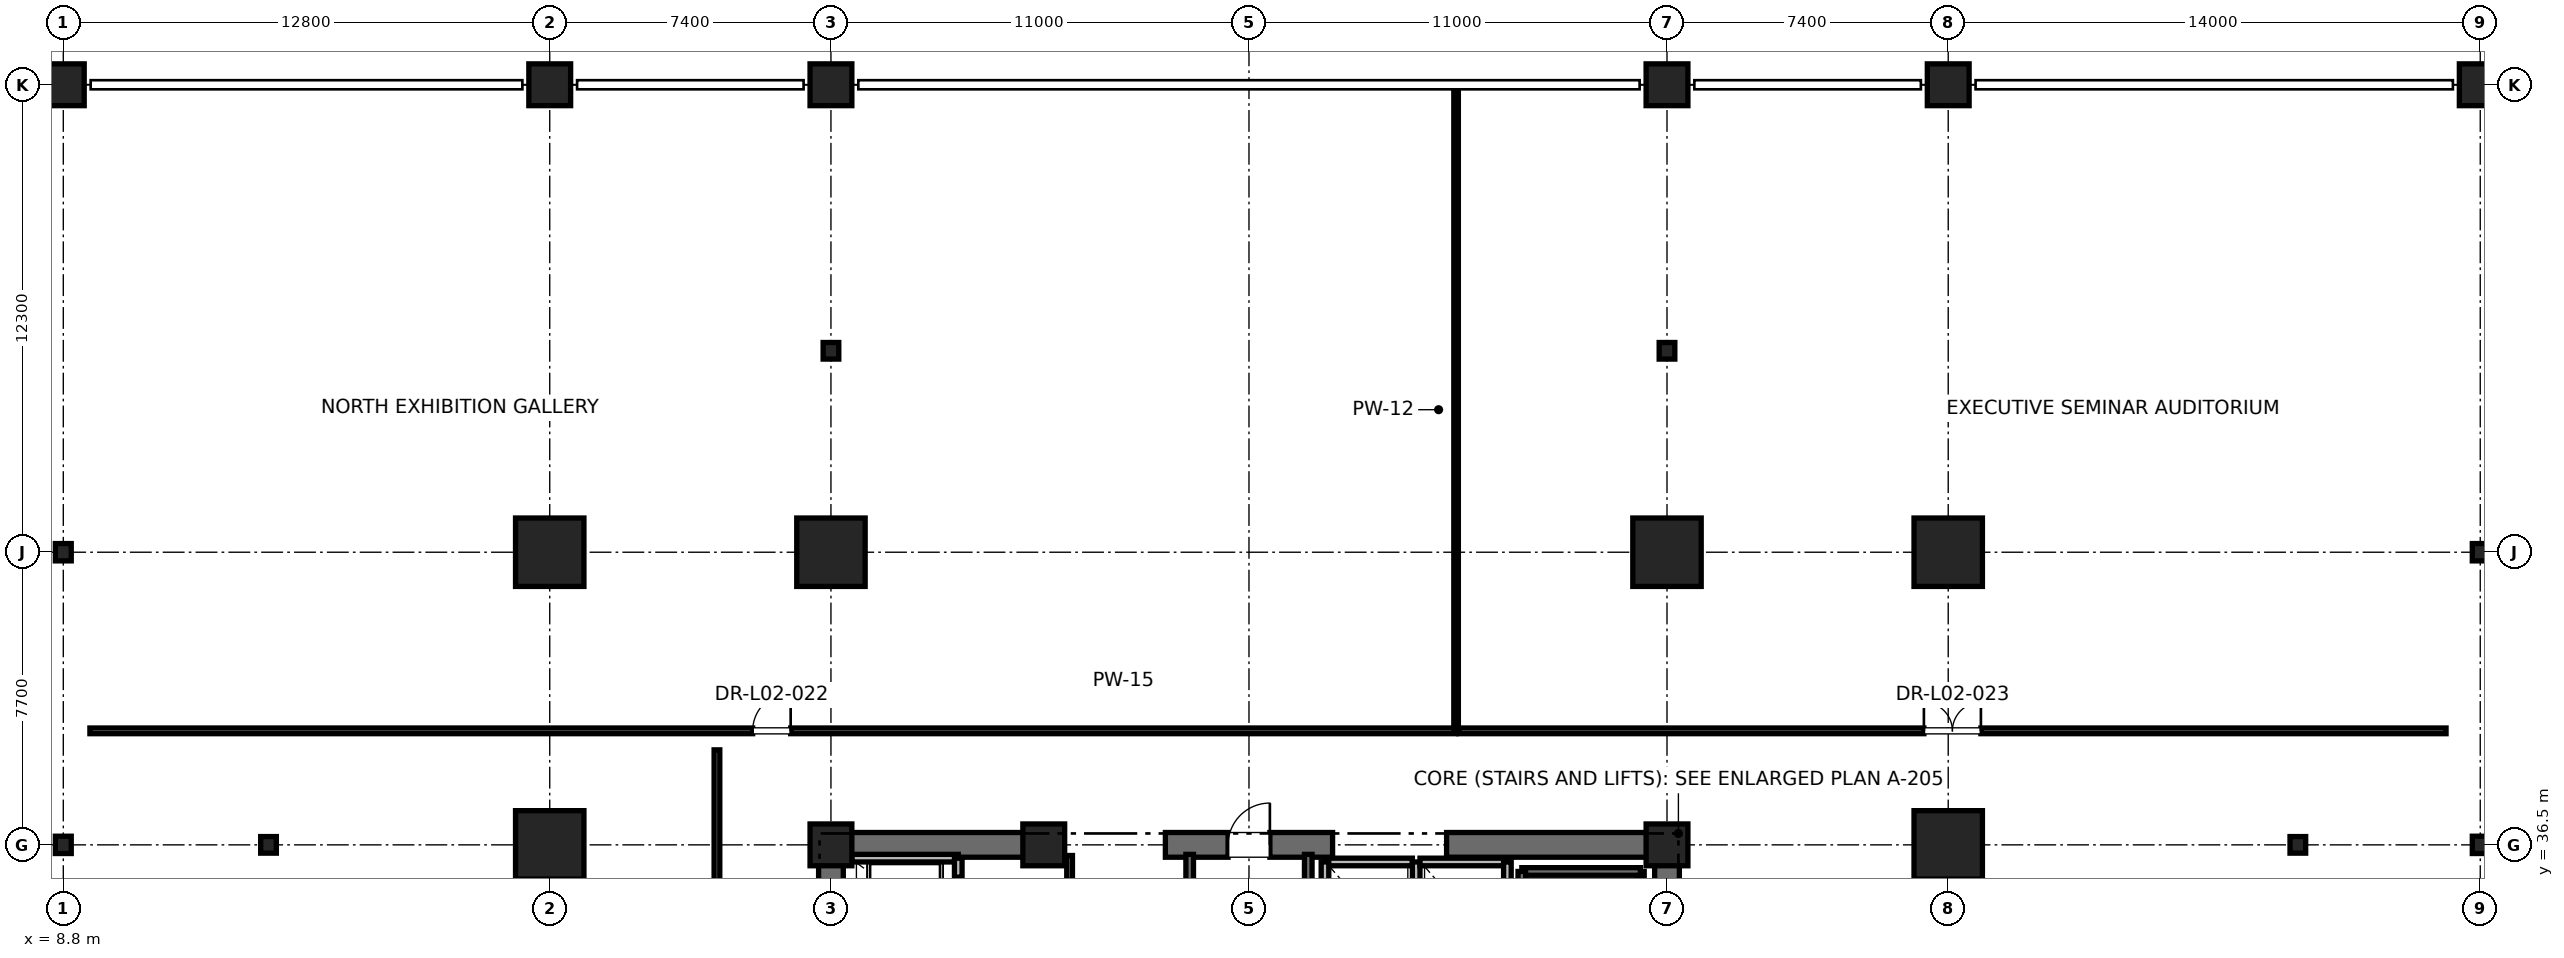
"""IFC4 building model, lengths in metres.
Left out: names, types, materials, properties, quantities, classifications, styles, units other than length and angle.
Written with IfcOpenShell. Run it as: python <this file> out.ifc"""

import sys

from ifc_helpers import new_model, si_unit, direction, frame, frame_2d, origin, origin_2d, place, context, subcontext, project, spatial, rectangle, i_section, extrude, element, fill, save


model = new_model("IFC4")
c1 = context("Model", 3, precision=1e-05, world=origin(), true_north=direction((0.0, 1.0)))
c2 = subcontext(c1, "Body", "Model", "MODEL_VIEW")
j1 = project(units=[si_unit("LENGTHUNIT", "METRE"), si_unit("PLANEANGLEUNIT", "RADIAN")], contexts=[c1])
p1 = place(None, origin())
s1 = spatial("IfcSite", under=j1, at=p1, CompositionType="ELEMENT")
p2 = place(p1, origin())
s2 = spatial("IfcBuilding", under=s1, at=p2, CompositionType="ELEMENT")
p3 = place(p2, frame((0.0, 0.0, 11.2)))
s3 = spatial("IfcBuildingStorey", under=s2, at=p3, CompositionType="ELEMENT", Elevation=11.2)
for number, where, z_axis, x_axis in (
    (1, (29.0, 44.2, 0.0), (0.0, 0.0, 1.0), (1.0, 0.0, 0.0)),
    (2, (51.0, 44.2, 0.0), (0.0, 0.0, 1.0), (1.0, 0.0, 0.0)),
    (3, (21.6, 36.5, 0.0), (0.0, 0.0, 1.0), (1.0, 0.0, 0.0)),
    (4, (58.4, 36.5, 0.0), (0.0, 0.0, 1.0), (1.0, 0.0, 0.0)),
    (5, (21.6, 44.2, 0.0), (0.0, 0.0, 1.0), (1.0, 0.0, 0.0)),
    (6, (58.4, 44.2, 0.0), (0.0, 0.0, 1.0), (1.0, 0.0, 0.0)),
):
    element("IfcColumn", number, at=place(p3, frame(where, z_axis=z_axis, x_axis=x_axis)), inside=s3, PredefinedType="COLUMN", context=c2, shape_type="SweptSolid", body=[
        extrude(rectangle(XDim=1.8, YDim=1.8, at=origin_2d()), origin(), (0.0, 0.0, 1.0), 5.2),
    ])
for number, where, z_axis, x_axis in (
    (7, (14.2, 36.5, 0.0), (0.0, 0.0, 1.0), (1.0, 0.0, 0.0)),
    (8, (67.6, 36.5, 0.0), (0.0, 0.0, 1.0), (1.0, 0.0, 0.0)),
    (9, (29.0, 49.5, 0.0), (0.0, 0.0, 1.0), (1.0, 0.0, 0.0)),
    (10, (51.0, 49.5, 0.0), (0.0, 0.0, 1.0), (1.0, 0.0, 0.0)),
):
    element("IfcColumn", number, at=place(p3, frame(where, z_axis=z_axis, x_axis=x_axis)), inside=s3, PredefinedType="COLUMN", context=c2, shape_type="SweptSolid", body=[
        extrude(i_section(OverallWidth=0.412, OverallDepth=0.437, WebThickness=0.036, FlangeThickness=0.058, FilletRadius=0.015, at=origin_2d()), origin(), (0.0, 0.0, 1.0), 5.2),
    ])
for number, where, z_axis, x_axis in (
    (11, (29.0, 36.5, 0.0), (0.0, 0.0, 1.0), (1.0, 0.0, 0.0)),
    (12, (51.0, 36.5, 0.0), (0.0, 0.0, 1.0), (1.0, 0.0, 0.0)),
    (13, (34.6, 36.5, 0.0), (0.0, 0.0, 1.0), (1.0, 0.0, 0.0)),
):
    element("IfcColumn", number, at=place(p3, frame(where, z_axis=z_axis, x_axis=x_axis)), inside=s3, PredefinedType="PILASTER", context=c2, shape_type="SweptSolid", body=[
        extrude(rectangle(XDim=1.1, YDim=1.1, at=origin_2d()), origin(), (0.0, 0.0, 1.0), 5.2),
    ])
for number, where, z_axis, x_axis in (
    (14, (8.8, 56.5, 0.0), (0.0, 0.0, 1.0), (1.0, 0.0, 0.0)),
    (15, (21.6, 56.5, 0.0), (0.0, 0.0, 1.0), (1.0, 0.0, 0.0)),
    (16, (29.0, 56.5, 0.0), (0.0, 0.0, 1.0), (1.0, 0.0, 0.0)),
    (17, (51.0, 56.5, 0.0), (0.0, 0.0, 1.0), (1.0, 0.0, 0.0)),
    (18, (58.4, 56.5, 0.0), (0.0, 0.0, 1.0), (1.0, 0.0, 0.0)),
    (19, (72.4, 56.5, 0.0), (0.0, 0.0, 1.0), (1.0, 0.0, 0.0)),
):
    element("IfcColumn", number, at=place(p3, frame(where, z_axis=z_axis, x_axis=x_axis)), inside=s3, PredefinedType="COLUMN", context=c2, shape_type="SweptSolid", body=[
        extrude(rectangle(XDim=1.1, YDim=1.1, at=origin_2d()), origin(), (0.0, 0.0, 1.0), 5.2),
    ])
for number, where, z_axis, x_axis in (
    (20, (8.8, 36.5, 0.0), (0.0, 0.0, 1.0), (1.0, 0.0, 0.0)),
    (21, (8.8, 44.2, 0.0), (0.0, 0.0, 1.0), (1.0, 0.0, 0.0)),
    (22, (72.4, 36.5, 0.0), (0.0, 0.0, 1.0), (1.0, 0.0, 0.0)),
    (23, (72.4, 44.2, 0.0), (0.0, 0.0, 1.0), (1.0, 0.0, 0.0)),
):
    element("IfcColumn", number, at=place(p3, frame(where, z_axis=z_axis, x_axis=x_axis)), inside=s3, PredefinedType="COLUMN", context=c2, shape_type="SweptSolid", body=[
        extrude(i_section(OverallWidth=0.418, OverallDepth=0.456, WebThickness=0.042, FlangeThickness=0.067, FilletRadius=0.015, at=origin_2d()), origin(), (0.0, 0.0, 1.0), 5.2),
    ])
p4 = place(p3, frame((29.0, 36.5, 0.0), z_axis=(0.0, 0.0, 1.0), x_axis=(1.0, 0.0, 0.0)))
e24 = element("IfcWall", 24, at=p4, inside=s3, PredefinedType="SHEAR", context=c2, shape_type="SweptSolid", body=[
    extrude(rectangle(XDim=5.8, YDim=0.65, at=frame_2d((2.9, 0.0))), origin(), (0.0, 0.0, 1.0), 4.92),
])
p5 = place(p3, frame((37.8, 36.5, 0.0), z_axis=(0.0, 0.0, 1.0), x_axis=(1.0, 0.0, 0.0)))
e25 = element("IfcWall", 25, at=p5, inside=s3, PredefinedType="SHEAR", context=c2, shape_type="SweptSolid", body=[
    extrude(rectangle(XDim=4.4, YDim=0.65, at=frame_2d((2.2, 0.0))), origin(), (0.0, 0.0, 1.0), 4.92),
])
p6 = place(p5, frame((1.65, 0.0, 0.0)))
e26 = element("IfcOpeningElement", 26, at=p6, cuts=e25, PredefinedType="OPENING", context=c2, shape_type="SweptSolid", body=[
    extrude(rectangle(XDim=1.1, YDim=2.15, at=frame_2d((0.55, 1.075))), frame((0.0, 0.325, 0.0), z_axis=(0.0, -1.0, 0.0), x_axis=(1.0, 0.0, 0.0)), (0.0, 0.0, 1.0), 0.65),
])
for number, where, z_axis, x_axis in (
    (27, (45.2, 36.5, 0.0), (0.0, 0.0, 1.0), (1.0, 0.0, 0.0)),
    (28, (29.0, 30.7, 0.0), (0.0, 0.0, 1.0), (0.0, 1.0, 0.0)),
):
    element("IfcWall", number, at=place(p3, frame(where, z_axis=z_axis, x_axis=x_axis)), inside=s3, PredefinedType="SHEAR", context=c2, shape_type="SweptSolid", body=[
        extrude(rectangle(XDim=5.8, YDim=0.65, at=frame_2d((2.9, 0.0))), origin(), (0.0, 0.0, 1.0), 4.92),
    ])
p7 = place(p3, frame((51.0, 27.7, 0.0), z_axis=(0.0, 0.0, 1.0), x_axis=(0.0, 1.0, 0.0)))
e29 = element("IfcWall", 29, at=p7, inside=s3, PredefinedType="SHEAR", context=c2, shape_type="SweptSolid", body=[
    extrude(rectangle(XDim=8.8, YDim=0.65, at=frame_2d((4.4, 0.0))), origin(), (0.0, 0.0, 1.0), 4.92),
])
p8 = place(p3, frame((50.3, 27.65, 0.0), z_axis=(0.0, 0.0, 1.0), x_axis=(0.0, 1.0, 0.0)))
e30 = element("IfcWall", 30, at=p8, inside=s3, PredefinedType="SOLIDWALL", context=c2, shape_type="SweptSolid", body=[
    extrude(rectangle(XDim=8.15, YDim=0.2, at=frame_2d((4.075, 0.0))), origin(), (0.0, 0.0, 1.0), 4.92),
])
p9 = place(p3, frame((47.18, 35.8, 0.0), z_axis=(0.0, 0.0, 1.0), x_axis=(1.0, 0.0, 0.0)))
e31 = element("IfcWall", 31, at=p9, inside=s3, PredefinedType="SOLIDWALL", context=c2, shape_type="SweptSolid", body=[
    extrude(rectangle(XDim=3.12, YDim=0.2, at=frame_2d((1.56, 0.0))), origin(), (0.0, 0.0, 1.0), 4.92),
])
p10 = place(p3, frame((47.18, 27.62, 0.0), z_axis=(0.0, 0.0, 1.0), x_axis=(0.0, 1.0, 0.0)))
e32 = element("IfcWall", 32, at=p10, inside=s3, PredefinedType="SOLIDWALL", context=c2, shape_type="SweptSolid", body=[
    extrude(rectangle(XDim=8.18, YDim=0.2, at=frame_2d((4.09, 0.0))), origin(), (0.0, 0.0, 1.0), 4.92),
])
p11 = place(p3, frame((38.44, 27.38, 0.0), z_axis=(0.0, 0.0, 1.0), x_axis=(0.0, 1.0, 0.0)))
e33 = element("IfcWall", 33, at=p11, inside=s3, PredefinedType="SOLIDWALL", context=c2, shape_type="SweptSolid", body=[
    extrude(rectangle(XDim=8.87, YDim=0.2, at=frame_2d((4.435, 0.0))), origin(), (0.0, 0.0, 1.0), 4.92),
])
p12 = place(p3, frame((41.56, 27.68, 0.0), z_axis=(0.0, 0.0, 1.0), x_axis=(0.0, 1.0, 0.0)))
e34 = element("IfcWall", 34, at=p12, inside=s3, PredefinedType="SOLIDWALL", context=c2, shape_type="SweptSolid", body=[
    extrude(rectangle(XDim=8.57, YDim=0.2, at=frame_2d((4.285, 0.0))), origin(), (0.0, 0.0, 1.0), 4.92),
])
p13 = place(p3, frame((32.35, 36.15, 0.0), z_axis=(0.0, 0.0, 1.0), x_axis=(-1.0, 0.0, 0.0)))
e35 = element("IfcWall", 35, at=p13, inside=s3, PredefinedType="SOLIDWALL", context=c2, shape_type="SweptSolid", body=[
    extrude(rectangle(XDim=2.8, YDim=0.2, at=frame_2d((1.4, 0.0))), origin(), (0.0, 0.0, 1.0), 3.979),
])
p14 = place(p3, frame((32.35, 34.05, 0.0), z_axis=(0.0, 0.0, 1.0), x_axis=(0.0, 1.0, 0.0)))
e36 = element("IfcWall", 36, at=p14, inside=s3, PredefinedType="SOLIDWALL", context=c2, shape_type="SweptSolid", body=[
    extrude(rectangle(XDim=2.1, YDim=0.2, at=frame_2d((1.05, 0.0))), origin(), (0.0, 0.0, 1.0), 4.92),
])
p15 = place(p14, frame((0.5, 0.0, 0.0)))
e37 = element("IfcOpeningElement", 37, at=p15, cuts=e36, PredefinedType="OPENING", context=c2, shape_type="SweptSolid", body=[
    extrude(rectangle(XDim=1.1, YDim=2.2, at=frame_2d((0.55, 1.1))), frame((0.0, 0.1, 0.0), z_axis=(0.0, -1.0, 0.0), x_axis=(1.0, 0.0, 0.0)), (0.0, 0.0, 1.0), 0.2),
])
p16 = place(p3, frame((44.3, 36.05, 0.0), z_axis=(0.0, 0.0, 1.0), x_axis=(-1.0, 0.0, 0.0)))
e38 = element("IfcWall", 38, at=p16, inside=s3, PredefinedType="SOLIDWALL", context=c2, shape_type="SweptSolid", body=[
    extrude(rectangle(XDim=2.3, YDim=0.2, at=frame_2d((1.15, 0.0))), origin(), (0.0, 0.0, 1.0), 3.7),
])
for number, where, z_axis, x_axis in (
    (39, (42.0, 36.05, 0.0), (0.0, 0.0, 1.0), (0.0, -1.0, 0.0)),
    (40, (44.4, 33.45, 0.0), (0.0, 0.0, 1.0), (0.0, 1.0, 0.0)),
):
    element("IfcWall", number, at=place(p3, frame(where, z_axis=z_axis, x_axis=x_axis)), inside=s3, PredefinedType="SOLIDWALL", context=c2, shape_type="SweptSolid", body=[
        extrude(rectangle(XDim=2.6, YDim=0.2, at=frame_2d((1.3, 0.0))), origin(), (0.0, 0.0, 1.0), 3.7),
    ])
p17 = place(p3, frame((46.8, 36.05, 0.0), z_axis=(0.0, 0.0, 1.0), x_axis=(-1.0, 0.0, 0.0)))
e41 = element("IfcWall", 41, at=p17, inside=s3, PredefinedType="SOLIDWALL", context=c2, shape_type="SweptSolid", body=[
    extrude(rectangle(XDim=2.3, YDim=0.2, at=frame_2d((1.15, 0.0))), origin(), (0.0, 0.0, 1.0), 3.7),
])
p18 = place(p3, frame((46.8, 33.45, 0.0), z_axis=(0.0, 0.0, 1.0), x_axis=(0.0, 1.0, 0.0)))
e42 = element("IfcWall", 42, at=p18, inside=s3, PredefinedType="SOLIDWALL", context=c2, shape_type="SweptSolid", body=[
    extrude(rectangle(XDim=2.6, YDim=0.2, at=frame_2d((1.3, 0.0))), origin(), (0.0, 0.0, 1.0), 4.92),
])
p19 = place(p3, frame((35.28, 33.95, 0.0), z_axis=(0.0, 0.0, 1.0), x_axis=(0.0, 1.0, 0.0)))
e43 = element("IfcWall", 43, at=p19, inside=s3, PredefinedType="PARTITIONING", context=c2, shape_type="SweptSolid", body=[
    extrude(rectangle(XDim=2.27, YDim=0.15, at=frame_2d((1.135, 0.0))), origin(), (0.0, 0.0, 1.0), 2.85),
])
p20 = place(p19, frame((0.66, 0.0, 0.0)))
e44 = element("IfcOpeningElement", 44, at=p20, cuts=e43, PredefinedType="OPENING", context=c2, shape_type="SweptSolid", body=[
    extrude(rectangle(XDim=0.95, YDim=2.15, at=frame_2d((0.475, 1.075))), frame((0.0, 0.075, 0.0), z_axis=(0.0, -1.0, 0.0), x_axis=(1.0, 0.0, 0.0)), (0.0, 0.0, 1.0), 0.15),
])
p21 = place(p3, frame((9.5, 39.5, 0.0), z_axis=(0.0, 0.0, 1.0), x_axis=(1.0, 0.0, 0.0)))
e45 = element("IfcWall", 45, at=p21, inside=s3, PredefinedType="PARTITIONING", context=c2, shape_type="SweptSolid", body=[
    extrude(rectangle(XDim=35.95, YDim=0.15, at=frame_2d((17.975, 0.0))), origin(), (0.0, 0.0, 1.0), 2.85),
])
p22 = place(p21, frame((17.44, 0.0, 0.0)))
e46 = element("IfcOpeningElement", 46, at=p22, cuts=e45, PredefinedType="OPENING", context=c2, shape_type="SweptSolid", body=[
    extrude(rectangle(XDim=1.0, YDim=2.15, at=frame_2d((0.5, 1.075))), frame((0.0, 0.075, 0.0), z_axis=(0.0, -1.0, 0.0), x_axis=(1.0, 0.0, 0.0)), (0.0, 0.0, 1.0), 0.15),
])
p23 = place(p3, frame((45.45, 39.5, 0.0), z_axis=(0.0, 0.0, 1.0), x_axis=(0.0, 1.0, 0.0)))
e47 = element("IfcWall", 47, at=p23, inside=s3, PredefinedType="PARTITIONING", context=c2, shape_type="SweptSolid", body=[
    extrude(rectangle(XDim=16.9, YDim=0.12, at=frame_2d((8.45, 0.0))), origin(), (0.0, 0.0, 1.0), 2.85),
])
p24 = place(p3, frame((45.52, 39.5, 0.0), z_axis=(0.0, 0.0, 1.0), x_axis=(1.0, 0.0, 0.0)))
e48 = element("IfcWall", 48, at=p24, inside=s3, PredefinedType="PARTITIONING", context=c2, shape_type="SweptSolid", body=[
    extrude(rectangle(XDim=25.98, YDim=0.15, at=frame_2d((12.99, 0.0))), origin(), (0.0, 0.0, 1.0), 2.85),
])
p25 = place(p24, frame((12.24, 0.0, 0.0)))
e49 = element("IfcOpeningElement", 49, at=p25, cuts=e48, PredefinedType="OPENING", context=c2, shape_type="SweptSolid", body=[
    extrude(rectangle(XDim=1.5, YDim=2.25, at=frame_2d((0.75, 1.125))), frame((0.0, 0.075, 0.0), z_axis=(0.0, -1.0, 0.0), x_axis=(1.0, 0.0, 0.0)), (0.0, 0.0, 1.0), 0.15),
])
p26 = place(p3, frame((26.0, 22.05, 0.0), z_axis=(0.0, 0.0, 1.0), x_axis=(0.0, 1.0, 0.0)))
e50 = element("IfcWall", 50, at=p26, inside=s3, PredefinedType="PARTITIONING", context=c2, shape_type="SweptSolid", body=[
    extrude(rectangle(XDim=16.95, YDim=0.15, at=frame_2d((8.475, 0.0))), origin(), (0.0, 0.0, 1.0), 2.85),
])
p27 = place(p26, frame((6.675, 0.0, 0.0)))
e51 = element("IfcOpeningElement", 51, at=p27, cuts=e50, PredefinedType="OPENING", context=c2, shape_type="SweptSolid", body=[
    extrude(rectangle(XDim=1.0, YDim=2.15, at=frame_2d((0.5, 1.075))), frame((0.0, 0.075, 0.0), z_axis=(0.0, -1.0, 0.0), x_axis=(1.0, 0.0, 0.0)), (0.0, 0.0, 1.0), 0.15),
])
p28 = place(p6, origin())
e52 = element("IfcDoor", 52, at=p28, inside=s3, OperationType="SINGLE_SWING_RIGHT", PredefinedType="DOOR", context=c2, shape_type="SweptSolid", body=[
    extrude(rectangle(XDim=1.1, YDim=2.15, at=frame_2d((0.55, 1.075))), frame((0.0, 0.025, 0.0), z_axis=(0.0, -1.0, 0.0), x_axis=(1.0, 0.0, 0.0)), (0.0, 0.0, 1.0), 0.05),
])
fill(e26, e52)
p29 = place(p15, origin())
e53 = element("IfcDoor", 53, at=p29, inside=s3, OperationType="SLIDING_TO_RIGHT", PredefinedType="DOOR", context=c2, shape_type="SweptSolid", body=[
    extrude(rectangle(XDim=1.1, YDim=2.2, at=frame_2d((0.55, 1.1))), frame((0.0, 0.025, 0.0), z_axis=(0.0, -1.0, 0.0), x_axis=(1.0, 0.0, 0.0)), (0.0, 0.0, 1.0), 0.05),
])
fill(e37, e53)
p30 = place(p22, origin())
e54 = element("IfcDoor", 54, at=p30, inside=s3, OperationType="SINGLE_SWING_RIGHT", PredefinedType="DOOR", context=c2, shape_type="SweptSolid", body=[
    extrude(rectangle(XDim=1.0, YDim=2.15, at=frame_2d((0.5, 1.075))), frame((0.0, 0.025, 0.0), z_axis=(0.0, -1.0, 0.0), x_axis=(1.0, 0.0, 0.0)), (0.0, 0.0, 1.0), 0.05),
])
fill(e46, e54)
p31 = place(p25, origin())
e55 = element("IfcDoor", 55, at=p31, inside=s3, OperationType="DOUBLE_DOOR_SINGLE_SWING", PredefinedType="DOOR", context=c2, shape_type="SweptSolid", body=[
    extrude(rectangle(XDim=1.5, YDim=2.25, at=frame_2d((0.75, 1.125))), frame((0.0, 0.025, 0.0), z_axis=(0.0, -1.0, 0.0), x_axis=(1.0, 0.0, 0.0)), (0.0, 0.0, 1.0), 0.05),
])
fill(e49, e55)
save(model, sys.argv[1])
